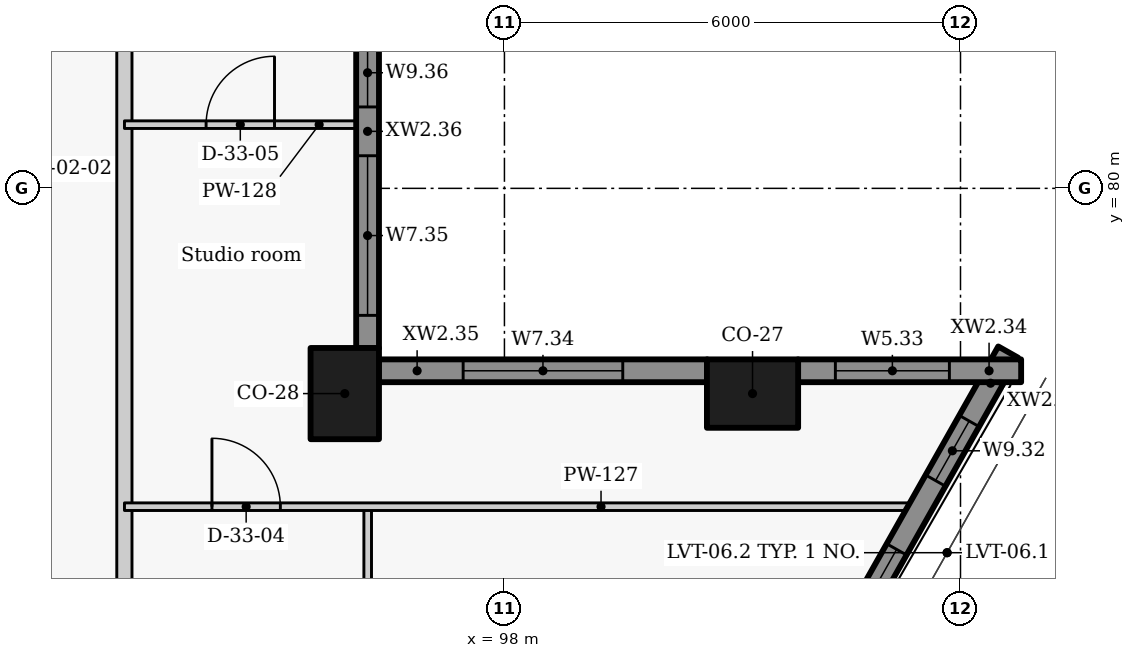
"""IFC4 building model, lengths in metres.
Left out: names, types, materials, properties, quantities, classifications, styles, units other than length and angle.
Written with IfcOpenShell. Run it as: python <this file> out.ifc"""

import sys

from ifc_helpers import new_model, si_unit, direction, frame, frame_2d, origin, origin_2d, place, context, subcontext, project, spatial, rectangle, extrude, element, fill, save


model = new_model("IFC4")
c1 = context("Model", 3, precision=1e-05, world=origin(), true_north=direction((0.0, 1.0)))
c2 = subcontext(c1, "Body", "Model", "MODEL_VIEW")
j1 = project(units=[si_unit("LENGTHUNIT", "METRE"), si_unit("PLANEANGLEUNIT", "RADIAN")], contexts=[c1])
p1 = place(None, origin())
s1 = spatial("IfcSite", under=j1, at=p1, CompositionType="ELEMENT")
p2 = place(p1, origin())
s2 = spatial("IfcBuilding", under=s1, at=p2, CompositionType="ELEMENT")
p3 = place(p2, frame((0.0, 0.0, 176.7)))
s3 = spatial("IfcBuildingStorey", under=s2, at=p3, CompositionType="ELEMENT", Elevation=176.7)
for number, where, z_axis, x_axis in (
    (1, (101.264, 77.3, 0.0), (0.0, 0.0, 1.0), (-1.0, 0.0, 0.0)),
    (2, (95.899, 77.3, 0.0), (0.0, 0.0, 1.0), (0.0, 1.0, 0.0)),
):
    element("IfcColumn", number, at=place(p3, frame(where, z_axis=z_axis, x_axis=x_axis)), inside=s3, PredefinedType="COLUMN", context=c2, shape_type="SweptSolid", body=[
        extrude(rectangle(XDim=1.2, YDim=0.9, at=origin_2d()), origin(), (0.0, 0.0, 1.0), 3.3),
    ])
p4 = place(p3, frame((101.977, 73.157, 0.0), z_axis=(0.0, 0.0, 1.0), x_axis=(0.492033360928, 0.870576344575, 0.0)))
e3 = element("IfcWall", 3, at=p4, inside=s3, PredefinedType="SOLIDWALL", context=c2, shape_type="SweptSolid", body=[
    extrude(rectangle(XDim=5.387, YDim=0.3, at=frame_2d((2.693, 0.0))), origin(), (0.0, 0.0, 1.0), 2.425),
])
p5 = place(p4, frame((0.905, 0.0, 0.9)))
e4 = element("IfcOpeningElement", 4, at=p5, cuts=e3, PredefinedType="OPENING", context=c2, shape_type="SweptSolid", body=[
    extrude(rectangle(XDim=1.5, YDim=1.1, at=frame_2d((0.75, 0.55))), frame((0.0, 0.16, 0.0), z_axis=(0.0, -1.0, 0.0), x_axis=(1.0, 0.0, 0.0)), (0.0, 0.0, 1.0), 0.32),
])
p6 = place(p4, frame((3.444, 0.0, 0.9)))
e5 = element("IfcOpeningElement", 5, at=p6, cuts=e3, PredefinedType="OPENING", context=c2, shape_type="SweptSolid", body=[
    extrude(rectangle(XDim=0.9, YDim=1.1, at=frame_2d((0.45, 0.55))), frame((0.0, 0.16, 0.0), z_axis=(0.0, -1.0, 0.0), x_axis=(1.0, 0.0, 0.0)), (0.0, 0.0, 1.0), 0.32),
])
p7 = place(p3, frame((104.798, 77.6, 0.0), z_axis=(0.0, 0.0, 1.0), x_axis=(-1.0, 0.0, 0.0)))
e6 = element("IfcWall", 6, at=p7, inside=s3, PredefinedType="SOLIDWALL", context=c2, shape_type="SweptSolid", body=[
    extrude(rectangle(XDim=2.938, YDim=0.3, at=frame_2d((1.469, 0.0))), origin(), (0.0, 0.0, 1.0), 2.425),
])
p8 = place(p7, frame((0.944, 0.0, 0.9)))
e7 = element("IfcOpeningElement", 7, at=p8, cuts=e6, PredefinedType="OPENING", context=c2, shape_type="SweptSolid", body=[
    extrude(rectangle(XDim=1.5, YDim=1.1, at=frame_2d((0.75, 0.55))), frame((0.0, 0.16, 0.0), z_axis=(0.0, -1.0, 0.0), x_axis=(1.0, 0.0, 0.0)), (0.0, 0.0, 1.0), 0.32),
])
p9 = place(p3, frame((100.668, 77.6, 0.0), z_axis=(0.0, 0.0, 1.0), x_axis=(-1.0, 0.0, 0.0)))
e8 = element("IfcWall", 8, at=p9, inside=s3, PredefinedType="SOLIDWALL", context=c2, shape_type="SweptSolid", body=[
    extrude(rectangle(XDim=4.323, YDim=0.3, at=frame_2d((2.161, 0.0))), origin(), (0.0, 0.0, 1.0), 2.425),
])
p10 = place(p9, frame((1.111, 0.0, 0.9)))
e9 = element("IfcOpeningElement", 9, at=p10, cuts=e8, PredefinedType="OPENING", context=c2, shape_type="SweptSolid", body=[
    extrude(rectangle(XDim=2.1, YDim=1.1, at=frame_2d((1.05, 0.55))), frame((0.0, 0.16, 0.0), z_axis=(0.0, -1.0, 0.0), x_axis=(1.0, 0.0, 0.0)), (0.0, 0.0, 1.0), 0.32),
])
p11 = place(p3, frame((96.199, 77.896, 0.0), z_axis=(0.0, 0.0, 1.0), x_axis=(0.0, 1.0, 0.0)))
e10 = element("IfcWall", 10, at=p11, inside=s3, PredefinedType="SOLIDWALL", context=c2, shape_type="SweptSolid", body=[
    extrude(rectangle(XDim=4.358, YDim=0.3, at=frame_2d((2.179, 0.0))), origin(), (0.0, 0.0, 1.0), 2.425),
])
p12 = place(p11, frame((0.433, 0.0, 0.9)))
e11 = element("IfcOpeningElement", 11, at=p12, cuts=e10, PredefinedType="OPENING", context=c2, shape_type="SweptSolid", body=[
    extrude(rectangle(XDim=2.1, YDim=1.1, at=frame_2d((1.05, 0.55))), frame((0.0, 0.16, 0.0), z_axis=(0.0, -1.0, 0.0), x_axis=(1.0, 0.0, 0.0)), (0.0, 0.0, 1.0), 0.32),
])
p13 = place(p11, frame((3.175, 0.0, 0.9)))
e12 = element("IfcOpeningElement", 12, at=p13, cuts=e10, PredefinedType="OPENING", context=c2, shape_type="SweptSolid", body=[
    extrude(rectangle(XDim=0.9, YDim=1.1, at=frame_2d((0.45, 0.55))), frame((0.0, 0.16, 0.0), z_axis=(0.0, -1.0, 0.0), x_axis=(1.0, 0.0, 0.0)), (0.0, 0.0, 1.0), 0.32),
])
p14 = place(p3, frame((93.0, 101.281, 0.0), z_axis=(0.0, 0.0, 1.0), x_axis=(0.0, -1.0, 0.0)))
e13 = element("IfcWall", 13, at=p14, inside=s3, PredefinedType="PARTITIONING", context=c2, shape_type="SweptSolid", body=[
    extrude(rectangle(XDim=42.606, YDim=0.2, at=frame_2d((21.303, 0.0))), origin(), (0.0, 0.0, 1.0), 2.405),
])
p15 = place(p14, frame((39.33, 0.0, 0.0)))
e14 = element("IfcOpeningElement", 14, at=p15, cuts=e13, PredefinedType="OPENING", context=c2, shape_type="SweptSolid", body=[
    extrude(rectangle(XDim=1.0, YDim=2.1, at=frame_2d((0.5, 1.05))), frame((0.0, 0.11, 0.0), z_axis=(0.0, -1.0, 0.0), x_axis=(1.0, 0.0, 0.0)), (0.0, 0.0, 1.0), 0.22),
])
p16 = place(p14, frame((28.005, 0.0, 0.0)))
e15 = element("IfcOpeningElement", 15, at=p16, cuts=e13, PredefinedType="OPENING", context=c2, shape_type="SweptSolid", body=[
    extrude(rectangle(XDim=1.0, YDim=2.1, at=frame_2d((0.5, 1.05))), frame((0.0, 0.11, 0.0), z_axis=(0.0, -1.0, 0.0), x_axis=(1.0, 0.0, 0.0)), (0.0, 0.0, 1.0), 0.22),
])
p17 = place(p14, frame((16.905, 0.0, 0.0)))
e16 = element("IfcOpeningElement", 16, at=p17, cuts=e13, PredefinedType="OPENING", context=c2, shape_type="SweptSolid", body=[
    extrude(rectangle(XDim=1.0, YDim=2.1, at=frame_2d((0.5, 1.05))), frame((0.0, 0.11, 0.0), z_axis=(0.0, -1.0, 0.0), x_axis=(1.0, 0.0, 0.0)), (0.0, 0.0, 1.0), 0.22),
])
p18 = place(p3, frame((96.201, 73.55, 0.0), z_axis=(0.0, 0.0, 1.0), x_axis=(0.0, 1.0, 0.0)))
e17 = element("IfcWall", 17, at=p18, inside=s3, PredefinedType="PARTITIONING", context=c2, shape_type="SweptSolid", body=[
    extrude(rectangle(XDim=2.262, YDim=0.1, at=frame_2d((1.131, 0.0))), origin(), (0.0, 0.0, 1.0), 3.025),
])
p19 = place(p3, frame((93.001, 75.812, 0.0), z_axis=(0.0, 0.0, 1.0), x_axis=(1.0, 0.0, 0.0)))
e18 = element("IfcWall", 18, at=p19, inside=s3, PredefinedType="PARTITIONING", context=c2, shape_type="SweptSolid", body=[
    extrude(rectangle(XDim=10.389, YDim=0.1, at=frame_2d((5.194, 0.0))), origin(), (0.0, 0.0, 1.0), 2.405),
])
p20 = place(p19, frame((1.151, 0.0, 0.0)))
e19 = element("IfcOpeningElement", 19, at=p20, cuts=e18, PredefinedType="OPENING", context=c2, shape_type="SweptSolid", body=[
    extrude(rectangle(XDim=0.9, YDim=2.1, at=frame_2d((0.45, 1.05))), frame((0.0, 0.06, 0.0), z_axis=(0.0, -1.0, 0.0), x_axis=(1.0, 0.0, 0.0)), (0.0, 0.0, 1.0), 0.12),
])
p21 = place(p3, frame((93.001, 80.838, 0.0), z_axis=(0.0, 0.0, 1.0), x_axis=(1.0, 0.0, 0.0)))
e20 = element("IfcWall", 20, at=p21, inside=s3, PredefinedType="PARTITIONING", context=c2, shape_type="SweptSolid", body=[
    extrude(rectangle(XDim=3.049, YDim=0.1, at=frame_2d((1.524, 0.0))), origin(), (0.0, 0.0, 1.0), 2.405),
])
p22 = place(p21, frame((1.074, 0.0, 0.0)))
e21 = element("IfcOpeningElement", 21, at=p22, cuts=e20, PredefinedType="OPENING", context=c2, shape_type="SweptSolid", body=[
    extrude(rectangle(XDim=0.9, YDim=2.1, at=frame_2d((0.45, 1.05))), frame((0.0, 0.06, 0.0), z_axis=(0.0, -1.0, 0.0), x_axis=(1.0, 0.0, 0.0)), (0.0, 0.0, 1.0), 0.12),
])
p23 = place(p5, origin())
e22 = element("IfcWindow", 22, at=p23, inside=s3, PartitioningType="SINGLE_PANEL", PredefinedType="WINDOW", context=c2, shape_type="SweptSolid", body=[
    extrude(rectangle(XDim=1.5, YDim=1.1, at=frame_2d((0.75, 0.55))), frame((0.0, 0.03, 0.0), z_axis=(0.0, -1.0, 0.0), x_axis=(1.0, 0.0, 0.0)), (0.0, 0.0, 1.0), 0.06),
])
fill(e4, e22)
p24 = place(p6, origin())
e23 = element("IfcWindow", 23, at=p24, inside=s3, PartitioningType="SINGLE_PANEL", PredefinedType="WINDOW", context=c2, shape_type="SweptSolid", body=[
    extrude(rectangle(XDim=0.9, YDim=1.1, at=frame_2d((0.45, 0.55))), frame((0.0, 0.03, 0.0), z_axis=(0.0, -1.0, 0.0), x_axis=(1.0, 0.0, 0.0)), (0.0, 0.0, 1.0), 0.06),
])
fill(e5, e23)
p25 = place(p8, origin())
e24 = element("IfcWindow", 24, at=p25, inside=s3, PartitioningType="SINGLE_PANEL", PredefinedType="WINDOW", context=c2, shape_type="SweptSolid", body=[
    extrude(rectangle(XDim=1.5, YDim=1.1, at=frame_2d((0.75, 0.55))), frame((0.0, 0.03, 0.0), z_axis=(0.0, -1.0, 0.0), x_axis=(1.0, 0.0, 0.0)), (0.0, 0.0, 1.0), 0.06),
])
fill(e7, e24)
p26 = place(p10, origin())
e25 = element("IfcWindow", 25, at=p26, inside=s3, PartitioningType="SINGLE_PANEL", PredefinedType="WINDOW", context=c2, shape_type="SweptSolid", body=[
    extrude(rectangle(XDim=2.1, YDim=1.1, at=frame_2d((1.05, 0.55))), frame((0.0, 0.03, 0.0), z_axis=(0.0, -1.0, 0.0), x_axis=(1.0, 0.0, 0.0)), (0.0, 0.0, 1.0), 0.06),
])
fill(e9, e25)
p27 = place(p12, origin())
e26 = element("IfcWindow", 26, at=p27, inside=s3, PartitioningType="SINGLE_PANEL", PredefinedType="WINDOW", context=c2, shape_type="SweptSolid", body=[
    extrude(rectangle(XDim=2.1, YDim=1.1, at=frame_2d((1.05, 0.55))), frame((0.0, 0.03, 0.0), z_axis=(0.0, -1.0, 0.0), x_axis=(1.0, 0.0, 0.0)), (0.0, 0.0, 1.0), 0.06),
])
fill(e11, e26)
p28 = place(p13, origin())
e27 = element("IfcWindow", 27, at=p28, inside=s3, PartitioningType="SINGLE_PANEL", PredefinedType="WINDOW", context=c2, shape_type="SweptSolid", body=[
    extrude(rectangle(XDim=0.9, YDim=1.1, at=frame_2d((0.45, 0.55))), frame((0.0, 0.03, 0.0), z_axis=(0.0, -1.0, 0.0), x_axis=(1.0, 0.0, 0.0)), (0.0, 0.0, 1.0), 0.06),
])
fill(e12, e27)
p29 = place(p20, origin())
e28 = element("IfcDoor", 28, at=p29, inside=s3, OperationType="SINGLE_SWING_LEFT", PredefinedType="DOOR", context=c2, shape_type="SweptSolid", body=[
    extrude(rectangle(XDim=0.9, YDim=2.1, at=frame_2d((0.45, 1.05))), frame((0.0, 0.025, 0.0), z_axis=(0.0, -1.0, 0.0), x_axis=(1.0, 0.0, 0.0)), (0.0, 0.0, 1.0), 0.05),
])
fill(e19, e28)
p30 = place(p22, origin())
e29 = element("IfcDoor", 29, at=p30, inside=s3, OperationType="SINGLE_SWING_RIGHT", PredefinedType="DOOR", context=c2, shape_type="SweptSolid", body=[
    extrude(rectangle(XDim=0.9, YDim=2.1, at=frame_2d((0.45, 1.05))), frame((0.0, 0.025, 0.0), z_axis=(0.0, -1.0, 0.0), x_axis=(1.0, 0.0, 0.0)), (0.0, 0.0, 1.0), 0.05),
])
fill(e21, e29)
save(model, sys.argv[1])
